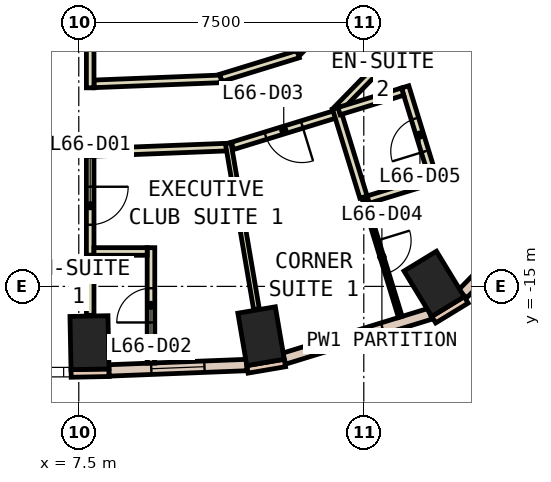
"""IFC4 building model, lengths in metres.
Left out: names, types, materials, properties, quantities, classifications, styles, units other than length and angle.
Written with IfcOpenShell. Run it as: python <this file> out.ifc"""

import sys

from ifc_helpers import new_model, si_unit, direction, frame, frame_2d, origin, origin_2d, place, context, subcontext, project, spatial, rectangle, extrude, element, fill, save


model = new_model("IFC4")
c1 = context("Model", 3, precision=1e-05, world=origin(), true_north=direction((0.0, 1.0)))
c2 = subcontext(c1, "Body", "Model", "MODEL_VIEW")
j1 = project(units=[si_unit("LENGTHUNIT", "METRE"), si_unit("PLANEANGLEUNIT", "RADIAN")], contexts=[c1])
p1 = place(None, origin())
s1 = spatial("IfcSite", under=j1, at=p1, CompositionType="ELEMENT")
p2 = place(p1, origin())
s2 = spatial("IfcBuilding", under=s1, at=p2, CompositionType="ELEMENT")
p3 = place(p2, frame((0.0, 0.0, 286.4)))
s3 = spatial("IfcBuildingStorey", under=s2, at=p3, CompositionType="ELEMENT", Elevation=286.4)
for number, where, z_axis, x_axis in (
    (1, (7.782, -16.481, 0.0), (0.0, 0.0, 1.0), (1.0, 0.02, 0.0)),
    (2, (12.297, -16.311, 0.0), (0.0, 0.0, 1.0), (0.986, 0.168, 0.0)),
    (3, (16.85, -14.933, 0.0), (0.0, 0.0, 1.0), (0.854, 0.521, 0.0)),
):
    element("IfcColumn", number, at=place(p3, frame(where, z_axis=z_axis, x_axis=x_axis)), inside=s3, PredefinedType="COLUMN", context=c2, shape_type="SweptSolid", body=[
        extrude(rectangle(XDim=1.0, YDim=1.4, at=origin_2d()), origin(), (0.0, 0.0, 1.0), 3.26),
    ])
for number, where, z_axis, x_axis in (
    (4, (7.298, -17.291, 0.0), (0.0, 0.0, 1.0), (1.0, 0.02, 0.0)),
    (5, (11.938, -17.183, 0.0), (0.0, 0.0, 1.0), (0.986, 0.168, 0.0)),
):
    element("IfcWall", number, at=place(p3, frame(where, z_axis=z_axis, x_axis=x_axis)), inside=s3, PredefinedType="STANDARD", context=c2, shape_type="SweptSolid", body=[
        extrude(rectangle(XDim=1.0, YDim=0.2, at=frame_2d((0.5, 0.0))), origin(), (0.0, 0.0, 1.0), 3.26),
    ])
p4 = place(p3, frame((16.84, -15.876, 0.0), z_axis=(0.0, 0.0, 1.0), x_axis=(0.853679739553, 0.520798331677, 0.0)))
e6 = element("IfcWall", 6, at=p4, inside=s3, PredefinedType="STANDARD", context=c2, shape_type="SweptSolid", body=[
    extrude(rectangle(XDim=1.0, YDim=0.2, at=frame_2d((0.5, 0.0))), origin(), (0.0, 0.0, 1.0), 3.26),
])
p5 = place(p3, frame((8.296, -17.211, 0.0), z_axis=(0.0, 0.0, 1.0), x_axis=(0.999234893779, 0.039110446866, 0.0)))
e7 = element("IfcWall", 7, at=p5, inside=s3, PredefinedType="STANDARD", context=c2, shape_type="SweptSolid", body=[
    extrude(rectangle(XDim=3.627, YDim=0.3, at=frame_2d((1.813, 0.0))), origin(), (0.0, 0.0, 1.0), 3.26),
])
p6 = place(p5, frame((1.113, 0.0, 0.9)))
e8 = element("IfcOpeningElement", 8, at=p6, cuts=e7, PredefinedType="OPENING", context=c2, shape_type="SweptSolid", body=[
    extrude(rectangle(XDim=1.4, YDim=2.0, at=frame_2d((0.7, 1.0))), frame((0.0, 0.16, 0.0), z_axis=(0.0, -1.0, 0.0), x_axis=(1.0, 0.0, 0.0)), (0.0, 0.0, 1.0), 0.32),
])
p7 = place(p3, frame((12.904, -16.901, 0.0), z_axis=(0.0, 0.0, 1.0), x_axis=(0.955866957005, 0.293799864716, 0.0)))
e9 = element("IfcWall", 9, at=p7, inside=s3, PredefinedType="STANDARD", context=c2, shape_type="SweptSolid", body=[
    extrude(rectangle(XDim=4.02, YDim=0.3, at=frame_2d((2.01, 0.0))), origin(), (0.0, 0.0, 1.0), 3.26),
])
p8 = place(p7, frame((1.31, 0.0, 0.9)))
e10 = element("IfcOpeningElement", 10, at=p8, cuts=e9, PredefinedType="OPENING", context=c2, shape_type="SweptSolid", body=[
    extrude(rectangle(XDim=1.4, YDim=2.0, at=frame_2d((0.7, 1.0))), frame((0.0, 0.16, 0.0), z_axis=(0.0, -1.0, 0.0), x_axis=(1.0, 0.0, 0.0)), (0.0, 0.0, 1.0), 0.32),
])
p9 = place(p3, frame((17.598, -15.2, 0.0), z_axis=(0.0, 0.0, 1.0), x_axis=(0.698555868355, 0.715555517614, 0.0)))
e11 = element("IfcWall", 11, at=p9, inside=s3, PredefinedType="STANDARD", context=c2, shape_type="SweptSolid", body=[
    extrude(rectangle(XDim=3.576, YDim=0.3, at=frame_2d((1.788, 0.0))), origin(), (0.0, 0.0, 1.0), 3.26),
])
p10 = place(p9, frame((1.088, 0.0, 0.9)))
e12 = element("IfcOpeningElement", 12, at=p10, cuts=e11, PredefinedType="OPENING", context=c2, shape_type="SweptSolid", body=[
    extrude(rectangle(XDim=1.4, YDim=2.0, at=frame_2d((0.7, 1.0))), frame((0.0, 0.16, 0.0), z_axis=(0.0, -1.0, 0.0), x_axis=(1.0, 0.0, 0.0)), (0.0, 0.0, 1.0), 0.32),
])
p11 = place(p3, frame((7.9, -9.671, 0.0), z_axis=(0.0, 0.0, 1.0), x_axis=(0.999223751627, 0.039394088186, 0.0)))
e13 = element("IfcWall", 13, at=p11, inside=s3, PredefinedType="PARTITIONING", context=c2, shape_type="SweptSolid", body=[
    extrude(rectangle(XDim=3.347, YDim=0.2, at=frame_2d((1.673, 0.0))), origin(), (0.0, 0.0, 1.0), 3.26),
])
p12 = place(p3, frame((11.239, -9.514, 0.0), z_axis=(0.0, 0.0, 1.0), x_axis=(0.955838469047, 0.293892533234, 0.0)))
e14 = element("IfcWall", 14, at=p12, inside=s3, PredefinedType="PARTITIONING", context=c2, shape_type="SweptSolid", body=[
    extrude(rectangle(XDim=2.13, YDim=0.2, at=frame_2d((1.065, 0.0))), origin(), (0.0, 0.0, 1.0), 3.26),
])
p13 = place(p3, frame((13.25, -8.846, 0.0), z_axis=(0.0, 0.0, 1.0), x_axis=(0.698333537371, 0.715772499181, 0.0)))
e15 = element("IfcWall", 15, at=p13, inside=s3, PredefinedType="PARTITIONING", context=c2, shape_type="SweptSolid", body=[
    extrude(rectangle(XDim=0.63, YDim=0.2, at=frame_2d((0.315, 0.0))), origin(), (0.0, 0.0, 1.0), 3.26),
])
p14 = place(p3, frame((11.474, -11.332, 0.0), z_axis=(0.0, 0.0, 1.0), x_axis=(-0.999232546126, -0.039170381199, 0.0)))
e16 = element("IfcWall", 16, at=p14, inside=s3, PredefinedType="PARTITIONING", context=c2, shape_type="SweptSolid", body=[
    extrude(rectangle(XDim=3.777, YDim=0.2, at=frame_2d((1.889, 0.0))), origin(), (0.0, 0.0, 1.0), 3.26),
])
p15 = place(p3, frame((14.243, -10.474, 0.0), z_axis=(0.0, 0.0, 1.0), x_axis=(-0.955937788993, -0.293569316475, 0.0)))
e17 = element("IfcWall", 17, at=p15, inside=s3, PredefinedType="PARTITIONING", context=c2, shape_type="SweptSolid", body=[
    extrude(rectangle(XDim=2.823, YDim=0.2, at=frame_2d((1.412, 0.0))), origin(), (0.0, 0.0, 1.0), 3.26),
])
p16 = place(p15, frame((0.912, 0.0, 0.0)))
e18 = element("IfcOpeningElement", 18, at=p16, cuts=e17, PredefinedType="OPENING", context=c2, shape_type="SweptSolid", body=[
    extrude(rectangle(XDim=1.0, YDim=2.1, at=frame_2d((0.5, 1.05))), frame((0.0, 0.11, 0.0), z_axis=(0.0, -1.0, 0.0), x_axis=(1.0, 0.0, 0.0)), (0.0, 0.0, 1.0), 0.22),
])
p17 = place(p3, frame((16.143, -7.096, 0.0), z_axis=(0.0, 0.0, 1.0), x_axis=(-0.270688011946, -0.962667128445, 0.0)))
e19 = element("IfcWall", 19, at=p17, inside=s3, PredefinedType="PARTITIONING", context=c2, shape_type="SweptSolid", body=[
    extrude(rectangle(XDim=2.088, YDim=0.2, at=frame_2d((1.044, 0.0))), origin(), (0.0, 0.0, 1.0), 3.26),
])
p18 = place(p3, frame((15.535, -9.081, 0.0), z_axis=(0.0, 0.0, 1.0), x_axis=(-0.698342132704, -0.715764113162, 0.0)))
e20 = element("IfcWall", 20, at=p18, inside=s3, PredefinedType="PARTITIONING", context=c2, shape_type="SweptSolid", body=[
    extrude(rectangle(XDim=1.836, YDim=0.2, at=frame_2d((0.918, 0.0))), origin(), (0.0, 0.0, 1.0), 3.26),
])
p19 = place(p3, frame((7.8, -5.899, 0.0), z_axis=(0.0, 0.0, 1.0), x_axis=(0.0, -1.0, 0.0)))
e21 = element("IfcWall", 21, at=p19, inside=s3, PredefinedType="PARTITIONING", context=c2, shape_type="SweptSolid", body=[
    extrude(rectangle(XDim=3.876, YDim=0.2, at=frame_2d((1.938, 0.0))), origin(), (0.0, 0.0, 1.0), 3.26),
])
p20 = place(p3, frame((7.8, -11.576, 0.0), z_axis=(0.0, 0.0, 1.0), x_axis=(0.0, -1.0, 0.0)))
e22 = element("IfcWall", 22, at=p20, inside=s3, PredefinedType="PARTITIONING", context=c2, shape_type="SweptSolid", body=[
    extrude(rectangle(XDim=2.605, YDim=0.2, at=frame_2d((1.302, 0.0))), origin(), (0.0, 0.0, 1.0), 3.26),
])
p21 = place(p20, frame((0.802, 0.0, 0.0)))
e23 = element("IfcOpeningElement", 23, at=p21, cuts=e22, PredefinedType="OPENING", context=c2, shape_type="SweptSolid", body=[
    extrude(rectangle(XDim=1.0, YDim=2.1, at=frame_2d((0.5, 1.05))), frame((0.0, 0.11, 0.0), z_axis=(0.0, -1.0, 0.0), x_axis=(1.0, 0.0, 0.0)), (0.0, 0.0, 1.0), 0.22),
])
p22 = place(p3, frame((7.8, -14.181, 0.0), z_axis=(0.0, 0.0, 1.0), x_axis=(0.0, -1.0, 0.0)))
e24 = element("IfcWall", 24, at=p22, inside=s3, PredefinedType="PARTITIONING", context=c2, shape_type="SweptSolid", body=[
    extrude(rectangle(XDim=1.58, YDim=0.2, at=frame_2d((0.79, 0.0))), origin(), (0.0, 0.0, 1.0), 3.26),
])
p23 = place(p3, frame((9.4, -17.018, 0.0), z_axis=(0.0, 0.0, 1.0), x_axis=(0.0, 1.0, 0.0)))
e25 = element("IfcWall", 25, at=p23, inside=s3, PredefinedType="PARTITIONING", context=c2, shape_type="SweptSolid", body=[
    extrude(rectangle(XDim=3.037, YDim=0.2, at=frame_2d((1.519, 0.0))), origin(), (0.0, 0.0, 1.0), 3.26),
])
p24 = place(p23, frame((1.069, 0.0, 0.0)))
e26 = element("IfcOpeningElement", 26, at=p24, cuts=e25, PredefinedType="OPENING", context=c2, shape_type="SweptSolid", body=[
    extrude(rectangle(XDim=0.9, YDim=2.1, at=frame_2d((0.45, 1.05))), frame((0.0, 0.11, 0.0), z_axis=(0.0, -1.0, 0.0), x_axis=(1.0, 0.0, 0.0)), (0.0, 0.0, 1.0), 0.22),
])
p25 = place(p3, frame((9.3, -14.081, 0.0), z_axis=(0.0, 0.0, 1.0), x_axis=(-1.0, 0.0, 0.0)))
e27 = element("IfcWall", 27, at=p25, inside=s3, PredefinedType="PARTITIONING", context=c2, shape_type="SweptSolid", body=[
    extrude(rectangle(XDim=1.4, YDim=0.2, at=frame_2d((0.7, 0.0))), origin(), (0.0, 0.0, 1.0), 3.26),
])
p26 = place(p3, frame((11.432, -11.234, 0.0), z_axis=(0.0, 0.0, 1.0), x_axis=(0.16797255243, -0.98579167253, 0.0)))
e28 = element("IfcWall", 28, at=p26, inside=s3, PredefinedType="PARTITIONING", context=c2, shape_type="SweptSolid", body=[
    extrude(rectangle(XDim=4.43, YDim=0.15, at=frame_2d((2.215, 0.0))), origin(), (0.0, 0.0, 1.0), 3.26),
])
p27 = place(p3, frame((14.992, -12.65, 0.0), z_axis=(0.0, 0.0, 1.0), x_axis=(0.293675064948, -0.955905307145, 0.0)))
e29 = element("IfcWall", 29, at=p27, inside=s3, PredefinedType="PARTITIONING", context=c2, shape_type="SweptSolid", body=[
    extrude(rectangle(XDim=3.3, YDim=0.1, at=frame_2d((1.65, 0.0))), origin(), (0.0, 0.0, 1.0), 3.26),
])
p28 = place(p27, frame((1.2, 0.0, 0.0)))
e30 = element("IfcOpeningElement", 30, at=p28, cuts=e29, PredefinedType="OPENING", context=c2, shape_type="SweptSolid", body=[
    extrude(rectangle(XDim=0.9, YDim=2.1, at=frame_2d((0.45, 1.05))), frame((0.0, 0.06, 0.0), z_axis=(0.0, -1.0, 0.0), x_axis=(1.0, 0.0, 0.0)), (0.0, 0.0, 1.0), 0.12),
])
p29 = place(p3, frame((14.272, -10.308, 0.0), z_axis=(0.0, 0.0, 1.0), x_axis=(0.293868765171, -0.955845776711, 0.0)))
e31 = element("IfcWall", 31, at=p29, inside=s3, PredefinedType="PARTITIONING", context=c2, shape_type="SweptSolid", body=[
    extrude(rectangle(XDim=2.45, YDim=0.2, at=frame_2d((1.225, 0.0))), origin(), (0.0, 0.0, 1.0), 3.26),
])
p30 = place(p3, frame((15.117, -12.716, 0.0), z_axis=(0.0, 0.0, 1.0), x_axis=(0.955940341053, 0.293561006177, 0.0)))
e32 = element("IfcWall", 32, at=p30, inside=s3, PredefinedType="PARTITIONING", context=c2, shape_type="SweptSolid", body=[
    extrude(rectangle(XDim=1.7, YDim=0.2, at=frame_2d((0.85, 0.0))), origin(), (0.0, 0.0, 1.0), 3.26),
])
p31 = place(p3, frame((16.867, -12.283, 0.0), z_axis=(0.0, 0.0, 1.0), x_axis=(-0.29397579302, 0.955812865114, 0.0)))
e33 = element("IfcWall", 33, at=p31, inside=s3, PredefinedType="PARTITIONING", context=c2, shape_type="SweptSolid", body=[
    extrude(rectangle(XDim=2.65, YDim=0.2, at=frame_2d((1.325, 0.0))), origin(), (0.0, 0.0, 1.0), 3.26),
])
p32 = place(p31, frame((0.875, 0.0, 0.0)))
e34 = element("IfcOpeningElement", 34, at=p32, cuts=e33, PredefinedType="OPENING", context=c2, shape_type="SweptSolid", body=[
    extrude(rectangle(XDim=0.9, YDim=2.1, at=frame_2d((0.45, 1.05))), frame((0.0, 0.11, 0.0), z_axis=(0.0, -1.0, 0.0), x_axis=(1.0, 0.0, 0.0)), (0.0, 0.0, 1.0), 0.22),
])
p33 = place(p3, frame((16.022, -9.875, 0.0), z_axis=(0.0, 0.0, 1.0), x_axis=(-0.955908620472, -0.293664279932, 0.0)))
e35 = element("IfcWall", 35, at=p33, inside=s3, PredefinedType="PARTITIONING", context=c2, shape_type="SweptSolid", body=[
    extrude(rectangle(XDim=1.75, YDim=0.2, at=frame_2d((0.875, 0.0))), origin(), (0.0, 0.0, 1.0), 3.26),
])
p34 = place(p6, origin())
e36 = element("IfcWindow", 36, at=p34, inside=s3, PartitioningType="SINGLE_PANEL", PredefinedType="WINDOW", context=c2, shape_type="SweptSolid", body=[
    extrude(rectangle(XDim=1.4, YDim=2.0, at=frame_2d((0.7, 1.0))), frame((0.0, 0.03, 0.0), z_axis=(0.0, -1.0, 0.0), x_axis=(1.0, 0.0, 0.0)), (0.0, 0.0, 1.0), 0.06),
])
fill(e8, e36)
p35 = place(p8, origin())
e37 = element("IfcWindow", 37, at=p35, inside=s3, PartitioningType="SINGLE_PANEL", PredefinedType="WINDOW", context=c2, shape_type="SweptSolid", body=[
    extrude(rectangle(XDim=1.4, YDim=2.0, at=frame_2d((0.7, 1.0))), frame((0.0, 0.03, 0.0), z_axis=(0.0, -1.0, 0.0), x_axis=(1.0, 0.0, 0.0)), (0.0, 0.0, 1.0), 0.06),
])
fill(e10, e37)
p36 = place(p21, origin())
e38 = element("IfcDoor", 38, at=p36, inside=s3, OperationType="SINGLE_SWING_LEFT", PredefinedType="DOOR", context=c2, shape_type="SweptSolid", body=[
    extrude(rectangle(XDim=1.0, YDim=2.1, at=frame_2d((0.5, 1.05))), frame((0.0, 0.025, 0.0), z_axis=(0.0, -1.0, 0.0), x_axis=(1.0, 0.0, 0.0)), (0.0, 0.0, 1.0), 0.05),
])
fill(e23, e38)
p37 = place(p24, origin())
e39 = element("IfcDoor", 39, at=p37, inside=s3, OperationType="SINGLE_SWING_RIGHT", PredefinedType="DOOR", context=c2, shape_type="SweptSolid", body=[
    extrude(rectangle(XDim=0.9, YDim=2.1, at=frame_2d((0.45, 1.05))), frame((0.0, 0.025, 0.0), z_axis=(0.0, -1.0, 0.0), x_axis=(1.0, 0.0, 0.0)), (0.0, 0.0, 1.0), 0.05),
])
fill(e26, e39)
p38 = place(p16, origin())
e40 = element("IfcDoor", 40, at=p38, inside=s3, OperationType="SINGLE_SWING_LEFT", PredefinedType="DOOR", context=c2, shape_type="SweptSolid", body=[
    extrude(rectangle(XDim=1.0, YDim=2.1, at=frame_2d((0.5, 1.05))), frame((0.0, 0.025, 0.0), z_axis=(0.0, -1.0, 0.0), x_axis=(1.0, 0.0, 0.0)), (0.0, 0.0, 1.0), 0.05),
])
fill(e18, e40)
p39 = place(p28, origin())
e41 = element("IfcDoor", 41, at=p39, inside=s3, OperationType="SINGLE_SWING_LEFT", PredefinedType="DOOR", context=c2, shape_type="SweptSolid", body=[
    extrude(rectangle(XDim=0.9, YDim=2.1, at=frame_2d((0.45, 1.05))), frame((0.0, 0.025, 0.0), z_axis=(0.0, -1.0, 0.0), x_axis=(1.0, 0.0, 0.0)), (0.0, 0.0, 1.0), 0.05),
])
fill(e30, e41)
p40 = place(p32, origin())
e42 = element("IfcDoor", 42, at=p40, inside=s3, OperationType="SINGLE_SWING_LEFT", PredefinedType="DOOR", context=c2, shape_type="SweptSolid", body=[
    extrude(rectangle(XDim=0.9, YDim=2.1, at=frame_2d((0.45, 1.05))), frame((0.0, 0.025, 0.0), z_axis=(0.0, -1.0, 0.0), x_axis=(1.0, 0.0, 0.0)), (0.0, 0.0, 1.0), 0.05),
])
fill(e34, e42)
save(model, sys.argv[1])
